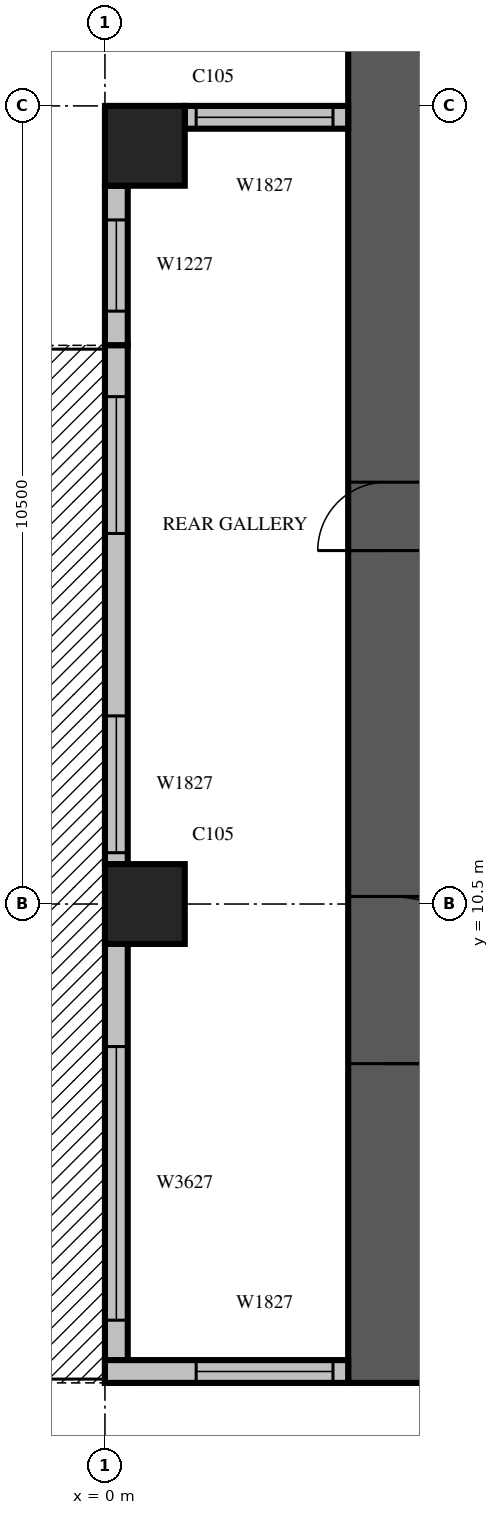
"""IFC4 building model, lengths in metres.
Left out: names, types, materials, properties, quantities, classifications, styles, units other than length and angle.
Written with IfcOpenShell. Run it as: python <this file> out.ifc"""

import sys

from ifc_helpers import new_model, si_unit, direction, frame, frame_2d, origin, origin_2d, place, context, subcontext, project, spatial, rectangle, extrude, source, transform, mapped, element, fill, save


model = new_model("IFC4")
c1 = context("Model", 3, precision=1e-05, world=origin(), true_north=direction((0.0, 1.0)))
c2 = subcontext(c1, "Body", "Model", "MODEL_VIEW")
j1 = project(units=[si_unit("LENGTHUNIT", "METRE"), si_unit("PLANEANGLEUNIT", "RADIAN")], contexts=[c1])
p1 = place(None, origin())
s1 = spatial("IfcSite", under=j1, at=p1, CompositionType="ELEMENT")
p2 = place(p1, origin())
s2 = spatial("IfcBuilding", under=s1, at=p2, CompositionType="ELEMENT")
p3 = place(p2, frame((0.0, 0.0, 103.5)))
s3 = spatial("IfcBuildingStorey", under=s2, at=p3, CompositionType="ELEMENT", Elevation=103.5)
m1 = source(origin(), c2, "Body", "SweptSolid", [
    extrude(rectangle(XDim=1.05, YDim=1.05, at=origin_2d()), origin(), (0.0, 0.0, 1.0), 4.2),
])
for number, where, z_axis, x_axis in (
    (1, (0.525, 10.5, 0.0), (0.0, 0.0, 1.0), (1.0, 0.0, 0.0)),
    (2, (0.525, 20.475, 0.0), (0.0, 0.0, 1.0), (1.0, 0.0, 0.0)),
):
    element("IfcColumn", number, at=place(p3, frame(where, z_axis=z_axis, x_axis=x_axis)), inside=s3, PredefinedType="COLUMN", context=c2, shape_type="MappedRepresentation", body=[
        mapped(m1, transform((0.0, 0.0, 0.0), scale=1.0)),
    ])
p4 = place(p3, frame((3.7, 4.2, 0.0), z_axis=(0.0, 0.0, 1.0), x_axis=(0.0, 1.0, 0.0)))
e3 = element("IfcWall", 3, at=p4, inside=s3, PredefinedType="SHEAR", context=c2, shape_type="SweptSolid", body=[
    extrude(rectangle(XDim=17.8, YDim=1.0, at=frame_2d((8.9, 0.0))), origin(), (0.0, 0.0, 1.0), 4.2),
])
p5 = place(p4, frame((4.2, 0.0, 0.0)))
e4 = element("IfcOpeningElement", 4, at=p5, cuts=e3, PredefinedType="OPENING", context=c2, shape_type="SweptSolid", body=[
    extrude(rectangle(XDim=2.2, YDim=2.1, at=frame_2d((1.1, 1.05))), frame((0.0, 0.51, 0.0), z_axis=(0.0, -1.0, 0.0), x_axis=(1.0, 0.0, 0.0)), (0.0, 0.0, 1.0), 1.02),
])
p6 = place(p4, frame((10.95, 0.0, 0.0)))
e5 = element("IfcOpeningElement", 5, at=p6, cuts=e3, PredefinedType="OPENING", context=c2, shape_type="SweptSolid", body=[
    extrude(rectangle(XDim=0.9, YDim=2.1, at=frame_2d((0.45, 1.05))), frame((0.0, 0.51, 0.0), z_axis=(0.0, -1.0, 0.0), x_axis=(1.0, 0.0, 0.0)), (0.0, 0.0, 1.0), 1.02),
])
m2 = source(origin(), c2, "Body", "SweptSolid", [
    extrude(rectangle(XDim=2.15, YDim=0.3, at=frame_2d((1.075, 0.0))), origin(), (0.0, 0.0, 1.0), 3.8),
])
p7 = place(p3, frame((3.2, 20.85, 0.0), z_axis=(0.0, 0.0, 1.0), x_axis=(-1.0, 0.0, 0.0)))
e6 = element("IfcWall", 6, at=p7, inside=s3, PredefinedType="STANDARD", context=c2, shape_type="MappedRepresentation", body=[
    mapped(m2, transform((0.0, 0.0, 0.0), scale=1.0)),
])
m3 = source(origin(), c2, "Body", "SweptSolid", [
    extrude(rectangle(XDim=1.8, YDim=2.7, at=frame_2d((0.9, 1.35))), frame((0.0, 0.16, 0.0), z_axis=(0.0, -1.0, 0.0), x_axis=(1.0, 0.0, 0.0)), (0.0, 0.0, 1.0), 0.32),
])
p8 = place(p7, frame((0.2, 0.0, 0.6)))
e7 = element("IfcOpeningElement", 7, at=p8, cuts=e6, PredefinedType="OPENING", context=c2, shape_type="MappedRepresentation", body=[
    mapped(m3, transform((0.0, 0.0, 0.0), scale=1.0)),
])
m4 = source(origin(), c2, "Body", "SweptSolid", [
    extrude(rectangle(XDim=2.1, YDim=0.3, at=frame_2d((1.05, 0.0))), origin(), (0.0, 0.0, 1.0), 3.8),
])
p9 = place(p3, frame((0.15, 19.95, 0.0), z_axis=(0.0, 0.0, 1.0), x_axis=(0.0, -1.0, 0.0)))
e8 = element("IfcWall", 8, at=p9, inside=s3, PredefinedType="STANDARD", context=c2, shape_type="MappedRepresentation", body=[
    mapped(m4, transform((0.0, 0.0, 0.0), scale=1.0)),
])
m5 = source(origin(), c2, "Body", "SweptSolid", [
    extrude(rectangle(XDim=1.2, YDim=2.7, at=frame_2d((0.6, 1.35))), frame((0.0, 0.16, 0.0), z_axis=(0.0, -1.0, 0.0), x_axis=(1.0, 0.0, 0.0)), (0.0, 0.0, 1.0), 0.32),
])
p10 = place(p9, frame((0.45, 0.0, 0.6)))
e9 = element("IfcOpeningElement", 9, at=p10, cuts=e8, PredefinedType="OPENING", context=c2, shape_type="MappedRepresentation", body=[
    mapped(m5, transform((0.0, 0.0, 0.0), scale=1.0)),
])
p11 = place(p3, frame((0.15, 17.85, 0.0), z_axis=(0.0, 0.0, 1.0), x_axis=(0.0, -1.0, 0.0)))
e10 = element("IfcWall", 10, at=p11, inside=s3, PredefinedType="STANDARD", context=c2, shape_type="SweptSolid", body=[
    extrude(rectangle(XDim=6.825, YDim=0.3, at=frame_2d((3.413, 0.0))), origin(), (0.0, 0.0, 1.0), 3.8),
])
m6 = source(origin(), c2, "Body", "SweptSolid", [
    extrude(rectangle(XDim=1.8, YDim=2.4, at=frame_2d((0.9, 1.2))), frame((0.0, 0.16, 0.0), z_axis=(0.0, -1.0, 0.0), x_axis=(1.0, 0.0, 0.0)), (0.0, 0.0, 1.0), 0.32),
])
p12 = place(p11, frame((0.675, 0.0, 0.0)))
e11 = element("IfcOpeningElement", 11, at=p12, cuts=e10, PredefinedType="OPENING", context=c2, shape_type="MappedRepresentation", body=[
    mapped(m6, transform((0.0, 0.0, 0.0), scale=1.0)),
])
p13 = place(p11, frame((4.875, 0.0, 0.6)))
e12 = element("IfcOpeningElement", 12, at=p13, cuts=e10, PredefinedType="OPENING", context=c2, shape_type="MappedRepresentation", body=[
    mapped(m3, transform((0.0, 0.0, 0.0), scale=1.0)),
])
p14 = place(p3, frame((0.15, 9.975, 0.0), z_axis=(0.0, 0.0, 1.0), x_axis=(0.0, -1.0, 0.0)))
e13 = element("IfcWall", 13, at=p14, inside=s3, PredefinedType="STANDARD", context=c2, shape_type="SweptSolid", body=[
    extrude(rectangle(XDim=5.775, YDim=0.3, at=frame_2d((2.888, 0.0))), origin(), (0.0, 0.0, 1.0), 3.8),
])
m7 = source(origin(), c2, "Body", "SweptSolid", [
    extrude(rectangle(XDim=3.6, YDim=2.7, at=frame_2d((1.8, 1.35))), frame((0.0, 0.16, 0.0), z_axis=(0.0, -1.0, 0.0), x_axis=(1.0, 0.0, 0.0)), (0.0, 0.0, 1.0), 0.32),
])
p15 = place(p14, frame((1.35, 0.0, 0.6)))
e14 = element("IfcOpeningElement", 14, at=p15, cuts=e13, PredefinedType="OPENING", context=c2, shape_type="MappedRepresentation", body=[
    mapped(m7, transform((0.0, 0.0, 0.0), scale=1.0)),
])
p16 = place(p3, frame((0.0, 4.35, 0.0), z_axis=(0.0, 0.0, 1.0), x_axis=(1.0, 0.0, 0.0)))
e15 = element("IfcWall", 15, at=p16, inside=s3, PredefinedType="STANDARD", context=c2, shape_type="SweptSolid", body=[
    extrude(rectangle(XDim=3.2, YDim=0.3, at=frame_2d((1.6, 0.0))), origin(), (0.0, 0.0, 1.0), 3.8),
])
p17 = place(p16, frame((1.2, 0.0, 0.6)))
e16 = element("IfcOpeningElement", 16, at=p17, cuts=e15, PredefinedType="OPENING", context=c2, shape_type="MappedRepresentation", body=[
    mapped(m3, transform((0.0, 0.0, 0.0), scale=1.0)),
])
m8 = source(origin(), c2, "Body", "SweptSolid", [
    extrude(rectangle(XDim=1.8, YDim=2.7, at=frame_2d((0.9, 1.35))), frame((0.0, 0.03, 0.0), z_axis=(0.0, -1.0, 0.0), x_axis=(1.0, 0.0, 0.0)), (0.0, 0.0, 1.0), 0.06),
])
p18 = place(p8, origin())
e17 = element("IfcWindow", 17, at=p18, inside=s3, PartitioningType="SINGLE_PANEL", PredefinedType="WINDOW", context=c2, shape_type="MappedRepresentation", body=[
    mapped(m8, transform((0.0, 0.0, 0.0), scale=1.0)),
])
fill(e7, e17)
m9 = source(origin(), c2, "Body", "SweptSolid", [
    extrude(rectangle(XDim=1.2, YDim=2.7, at=frame_2d((0.6, 1.35))), frame((0.0, 0.03, 0.0), z_axis=(0.0, -1.0, 0.0), x_axis=(1.0, 0.0, 0.0)), (0.0, 0.0, 1.0), 0.06),
])
p19 = place(p10, origin())
e18 = element("IfcWindow", 18, at=p19, inside=s3, PartitioningType="SINGLE_PANEL", PredefinedType="WINDOW", context=c2, shape_type="MappedRepresentation", body=[
    mapped(m9, transform((0.0, 0.0, 0.0), scale=1.0)),
])
fill(e9, e18)
m10 = source(origin(), c2, "Body", "SweptSolid", [
    extrude(rectangle(XDim=1.8, YDim=2.4, at=frame_2d((0.9, 1.2))), frame((0.0, 0.025, 0.0), z_axis=(0.0, -1.0, 0.0), x_axis=(1.0, 0.0, 0.0)), (0.0, 0.0, 1.0), 0.05),
])
p20 = place(p12, origin())
e19 = element("IfcDoor", 19, at=p20, inside=s3, OperationType="SLIDING_TO_LEFT", PredefinedType="DOOR", context=c2, shape_type="MappedRepresentation", body=[
    mapped(m10, transform((0.0, 0.0, 0.0), scale=1.0)),
])
fill(e11, e19)
p21 = place(p13, origin())
e20 = element("IfcWindow", 20, at=p21, inside=s3, PartitioningType="SINGLE_PANEL", PredefinedType="WINDOW", context=c2, shape_type="MappedRepresentation", body=[
    mapped(m8, transform((0.0, 0.0, 0.0), scale=1.0)),
])
fill(e12, e20)
m11 = source(origin(), c2, "Body", "SweptSolid", [
    extrude(rectangle(XDim=3.6, YDim=2.7, at=frame_2d((1.8, 1.35))), frame((0.0, 0.03, 0.0), z_axis=(0.0, -1.0, 0.0), x_axis=(1.0, 0.0, 0.0)), (0.0, 0.0, 1.0), 0.06),
])
p22 = place(p15, origin())
e21 = element("IfcWindow", 21, at=p22, inside=s3, PartitioningType="SINGLE_PANEL", PredefinedType="WINDOW", context=c2, shape_type="MappedRepresentation", body=[
    mapped(m11, transform((0.0, 0.0, 0.0), scale=1.0)),
])
fill(e14, e21)
p23 = place(p17, origin())
e22 = element("IfcWindow", 22, at=p23, inside=s3, PartitioningType="SINGLE_PANEL", PredefinedType="WINDOW", context=c2, shape_type="MappedRepresentation", body=[
    mapped(m8, transform((0.0, 0.0, 0.0), scale=1.0)),
])
fill(e16, e22)
m12 = source(origin(), c2, "Body", "SweptSolid", [
    extrude(rectangle(XDim=2.2, YDim=2.1, at=frame_2d((1.1, 1.05))), frame((0.0, 0.025, 0.0), z_axis=(0.0, -1.0, 0.0), x_axis=(1.0, 0.0, 0.0)), (0.0, 0.0, 1.0), 0.05),
])
p24 = place(p5, origin())
e23 = element("IfcDoor", 23, at=p24, inside=s3, OperationType="DOUBLE_DOOR_SINGLE_SWING", PredefinedType="DOOR", context=c2, shape_type="MappedRepresentation", body=[
    mapped(m12, transform((0.0, 0.0, 0.0), scale=1.0)),
])
fill(e4, e23)
m13 = source(origin(), c2, "Body", "SweptSolid", [
    extrude(rectangle(XDim=0.9, YDim=2.1, at=frame_2d((0.45, 1.05))), frame((0.0, 0.025, 0.0), z_axis=(0.0, -1.0, 0.0), x_axis=(1.0, 0.0, 0.0)), (0.0, 0.0, 1.0), 0.05),
])
p25 = place(p6, origin())
e24 = element("IfcDoor", 24, at=p25, inside=s3, OperationType="SINGLE_SWING_LEFT", PredefinedType="DOOR", context=c2, shape_type="MappedRepresentation", body=[
    mapped(m13, transform((0.0, 0.0, 0.0), scale=1.0)),
])
fill(e5, e24)
save(model, sys.argv[1])
